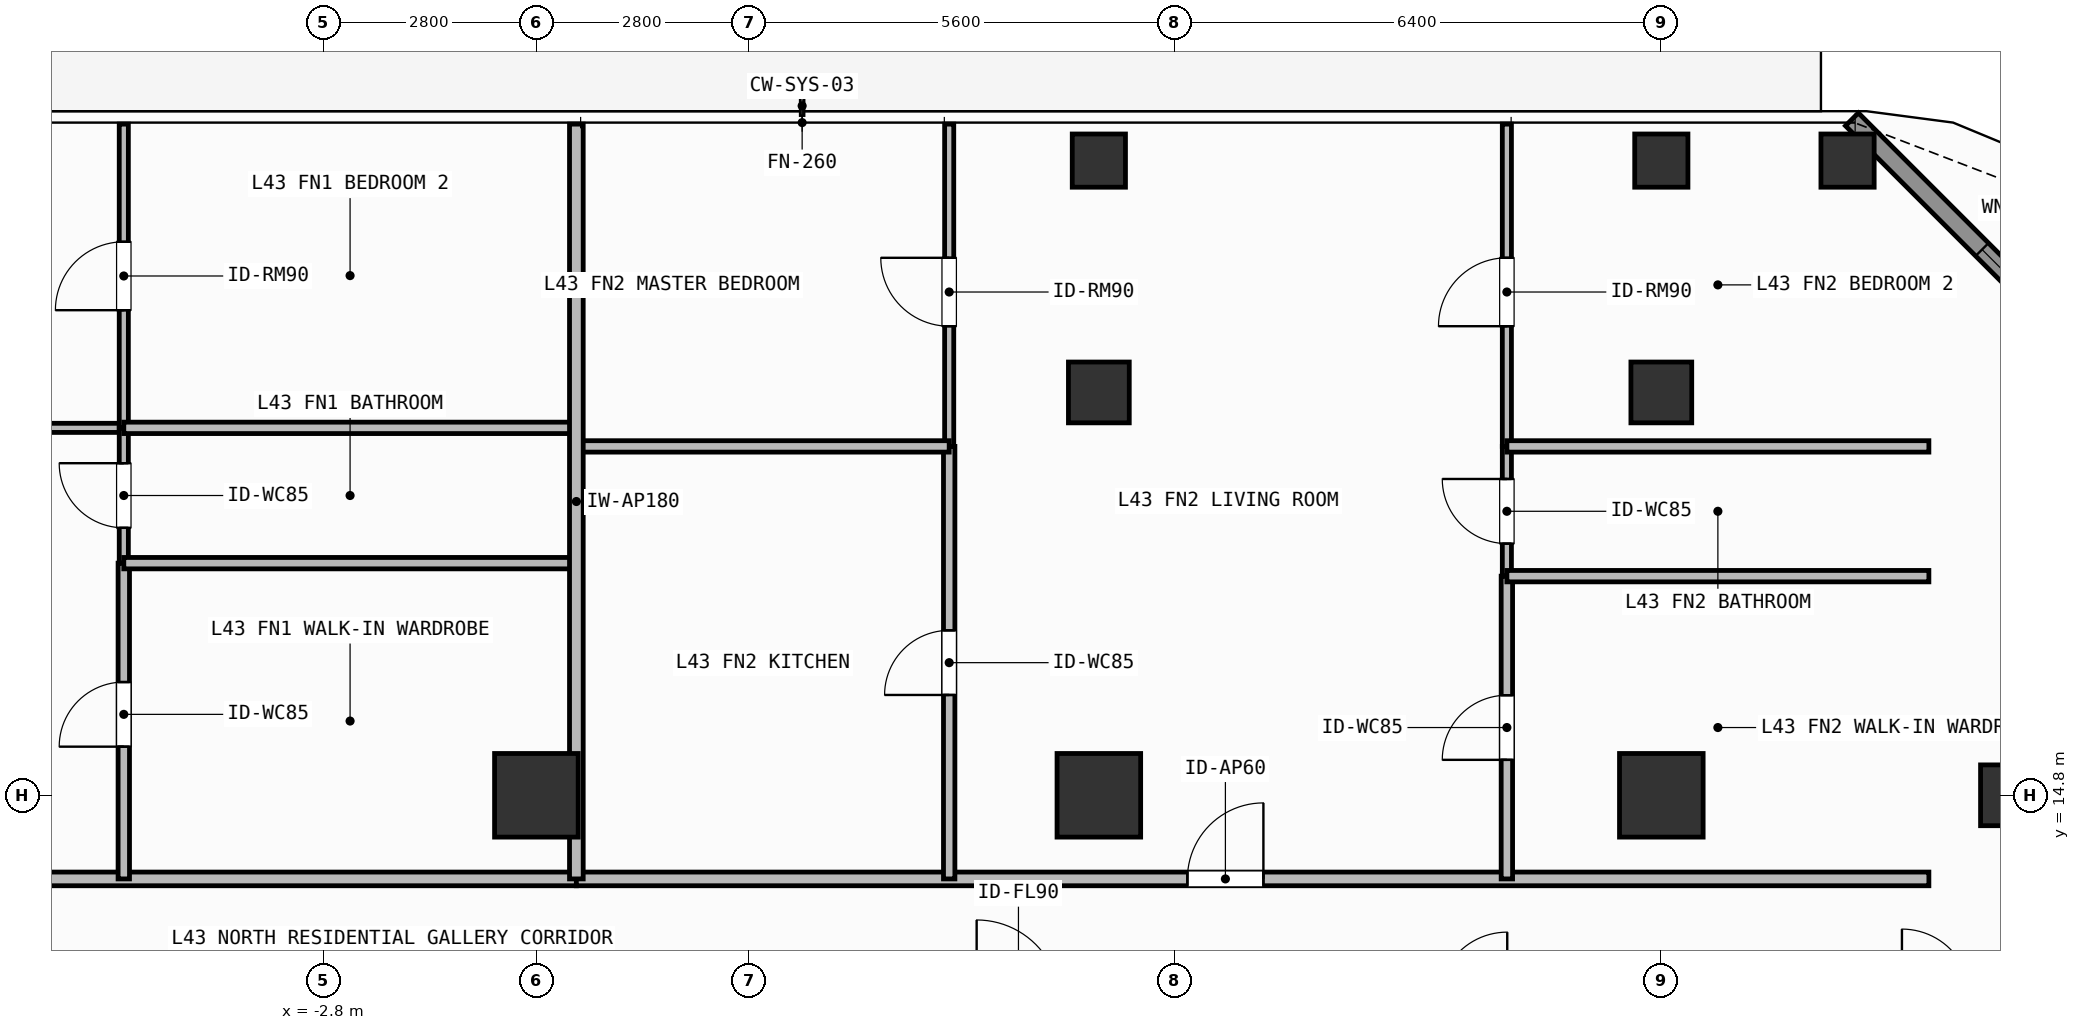
"""IFC4 building model, lengths in metres.
Left out: names, types, materials, properties, quantities, classifications, styles, units other than length and angle.
Written with IfcOpenShell. Run it as: python <this file> out.ifc"""

import sys

from ifc_helpers import new_model, si_unit, direction, frame, frame_2d, origin, origin_2d, place, context, subcontext, project, spatial, rectangle, hollow_rectangle, extrude, element, fill, save


model = new_model("IFC4")
c1 = context("Model", 3, precision=1e-05, world=origin(), true_north=direction((0.0, 1.0)))
c2 = subcontext(c1, "Body", "Model", "MODEL_VIEW")
j1 = project(units=[si_unit("LENGTHUNIT", "METRE"), si_unit("PLANEANGLEUNIT", "RADIAN")], contexts=[c1])
p1 = place(None, origin())
s1 = spatial("IfcSite", under=j1, at=p1, CompositionType="ELEMENT")
p2 = place(p1, origin())
s2 = spatial("IfcBuilding", under=s1, at=p2, CompositionType="ELEMENT")
p3 = place(p2, frame((0.0, 0.0, 175.8)))
s3 = spatial("IfcBuildingStorey", under=s2, at=p3, CompositionType="ELEMENT", Elevation=175.8)
for number, where, z_axis, x_axis in (
    (1, (0.0, 14.8, 0.0), (0.0, 0.0, 1.0), (1.0, 0.0, 0.0)),
    (2, (7.4, 14.8, 0.0), (0.0, 0.0, 1.0), (1.0, 0.0, 0.0)),
    (3, (14.8, 14.8, 0.0), (0.0, 0.0, 1.0), (1.0, 0.0, 0.0)),
):
    element("IfcColumn", number, at=place(p3, frame(where, z_axis=z_axis, x_axis=x_axis)), inside=s3, PredefinedType="COLUMN", context=c2, shape_type="SweptSolid", body=[
        extrude(rectangle(XDim=1.1, YDim=1.1, at=origin_2d()), origin(), (0.0, 0.0, 1.0), 3.9),
    ])
for number, where, z_axis, x_axis in (
    (4, (19.4, 14.8, 0.0), (0.0, 0.0, 1.0), (1.0, 0.0, 0.0)),
    (5, (7.4, 20.1, 0.0), (0.0, 0.0, 1.0), (1.0, 0.0, 0.0)),
    (6, (14.8, 20.1, 0.0), (0.0, 0.0, 1.0), (1.0, 0.0, 0.0)),
):
    element("IfcColumn", number, at=place(p3, frame(where, z_axis=z_axis, x_axis=x_axis)), inside=s3, PredefinedType="COLUMN", context=c2, shape_type="SweptSolid", body=[
        extrude(hollow_rectangle(XDim=0.8, YDim=0.8, WallThickness=0.036, at=origin_2d()), origin(), (0.0, 0.0, 1.0), 3.9),
    ])
for number, where, z_axis, x_axis in (
    (7, (17.25, 23.15, 0.0), (0.0, 0.0, 1.0), (1.0, 0.0, 0.0)),
    (8, (7.4, 23.15, 0.0), (0.0, 0.0, 1.0), (1.0, 0.0, 0.0)),
    (9, (14.8, 23.15, 0.0), (0.0, 0.0, 1.0), (1.0, 0.0, 0.0)),
):
    element("IfcColumn", number, at=place(p3, frame(where, z_axis=z_axis, x_axis=x_axis)), inside=s3, PredefinedType="COLUMN", context=c2, shape_type="SweptSolid", body=[
        extrude(hollow_rectangle(XDim=0.7, YDim=0.7, WallThickness=0.032, at=origin_2d()), origin(), (0.0, 0.0, 1.0), 3.9),
    ])
p4 = place(p3, frame((17.308, 23.692, 0.0), z_axis=(0.0, 0.0, 1.0), x_axis=(0.707106781187, -0.707106781187, 0.0)))
e10 = element("IfcWall", 10, at=p4, inside=s3, PredefinedType="SOLIDWALL", context=c2, shape_type="SweptSolid", body=[
    extrude(rectangle(XDim=6.343, YDim=0.24, at=frame_2d((3.171, 0.0))), origin(), (0.0, 0.0, 1.0), 3.68),
])
p5 = place(p4, frame((2.421, 0.0, 0.8)))
e11 = element("IfcOpeningElement", 11, at=p5, cuts=e10, PredefinedType="OPENING", context=c2, shape_type="SweptSolid", body=[
    extrude(rectangle(XDim=1.5, YDim=1.85, at=frame_2d((0.75, 0.925))), frame((0.0, 0.13, 0.0), z_axis=(0.0, -1.0, 0.0), x_axis=(1.0, 0.0, 0.0)), (0.0, 0.0, 1.0), 0.26),
])
p6 = place(p3, frame((-22.12, 13.7, 0.0), z_axis=(0.0, 0.0, 1.0), x_axis=(1.0, 0.0, 0.0)))
e12 = element("IfcWall", 12, at=p6, inside=s3, PredefinedType="PARTITIONING", context=c2, shape_type="SweptSolid", body=[
    extrude(rectangle(XDim=22.646, YDim=0.18, at=frame_2d((11.323, 0.0))), origin(), (0.0, 0.0, 1.0), 3.68),
])
p7 = place(p6, frame((10.554, 0.0, 0.0)))
e13 = element("IfcOpeningElement", 13, at=p7, cuts=e12, PredefinedType="OPENING", context=c2, shape_type="SweptSolid", body=[
    extrude(rectangle(XDim=1.0, YDim=2.2, at=frame_2d((0.5, 1.1))), frame((0.0, 0.1, 0.0), z_axis=(0.0, -1.0, 0.0), x_axis=(1.0, 0.0, 0.0)), (0.0, 0.0, 1.0), 0.2),
])
p8 = place(p3, frame((-16.726, 19.634, 0.0), z_axis=(0.0, 0.0, 1.0), x_axis=(1.0, 0.0, 0.0)))
e14 = element("IfcWall", 14, at=p8, inside=s3, PredefinedType="PARTITIONING", context=c2, shape_type="SweptSolid", body=[
    extrude(rectangle(XDim=11.298, YDim=0.12, at=frame_2d((5.649, 0.0))), origin(), (0.0, 0.0, 1.0), 3.68),
])
p9 = place(p8, frame((5.199, 0.0, 0.0)))
e15 = element("IfcOpeningElement", 15, at=p9, cuts=e14, PredefinedType="OPENING", context=c2, shape_type="SweptSolid", body=[
    extrude(rectangle(XDim=0.9, YDim=2.1, at=frame_2d((0.45, 1.05))), frame((0.0, 0.07, 0.0), z_axis=(0.0, -1.0, 0.0), x_axis=(1.0, 0.0, 0.0)), (0.0, 0.0, 1.0), 0.14),
])
p10 = place(p3, frame((-5.428, 13.7, 0.0), z_axis=(0.0, 0.0, 1.0), x_axis=(0.0, 1.0, 0.0)))
e16 = element("IfcWall", 16, at=p10, inside=s3, PredefinedType="PARTITIONING", context=c2, shape_type="SweptSolid", body=[
    extrude(rectangle(XDim=4.154, YDim=0.15, at=frame_2d((2.077, 0.0))), origin(), (0.0, 0.0, 1.0), 3.68),
])
p11 = place(p10, frame((1.74, 0.0, 0.0)))
e17 = element("IfcOpeningElement", 17, at=p11, cuts=e16, PredefinedType="OPENING", context=c2, shape_type="SweptSolid", body=[
    extrude(rectangle(XDim=0.85, YDim=2.1, at=frame_2d((0.425, 1.05))), frame((0.0, 0.085, 0.0), z_axis=(0.0, -1.0, 0.0), x_axis=(1.0, 0.0, 0.0)), (0.0, 0.0, 1.0), 0.17),
])
p12 = place(p3, frame((-5.428, 17.854, 0.0), z_axis=(0.0, 0.0, 1.0), x_axis=(0.0, 1.0, 0.0)))
e18 = element("IfcWall", 18, at=p12, inside=s3, PredefinedType="PARTITIONING", context=c2, shape_type="SweptSolid", body=[
    extrude(rectangle(XDim=1.78, YDim=0.12, at=frame_2d((0.89, 0.0))), origin(), (0.0, 0.0, 1.0), 3.68),
])
p13 = place(p12, frame((0.465, 0.0, 0.0)))
e19 = element("IfcOpeningElement", 19, at=p13, cuts=e18, PredefinedType="OPENING", context=c2, shape_type="SweptSolid", body=[
    extrude(rectangle(XDim=0.85, YDim=2.1, at=frame_2d((0.425, 1.05))), frame((0.0, 0.07, 0.0), z_axis=(0.0, -1.0, 0.0), x_axis=(1.0, 0.0, 0.0)), (0.0, 0.0, 1.0), 0.14),
])
p14 = place(p3, frame((-5.428, 19.634, 0.0), z_axis=(0.0, 0.0, 1.0), x_axis=(0.0, 1.0, 0.0)))
e20 = element("IfcWall", 20, at=p14, inside=s3, PredefinedType="PARTITIONING", context=c2, shape_type="SweptSolid", body=[
    extrude(rectangle(XDim=3.996, YDim=0.12, at=frame_2d((1.998, 0.0))), origin(), (0.0, 0.0, 1.0), 3.68),
])
p15 = place(p14, frame((1.548, 0.0, 0.0)))
e21 = element("IfcOpeningElement", 21, at=p15, cuts=e20, PredefinedType="OPENING", context=c2, shape_type="SweptSolid", body=[
    extrude(rectangle(XDim=0.9, YDim=2.1, at=frame_2d((0.45, 1.05))), frame((0.0, 0.07, 0.0), z_axis=(0.0, -1.0, 0.0), x_axis=(1.0, 0.0, 0.0)), (0.0, 0.0, 1.0), 0.14),
])
p16 = place(p3, frame((0.526, 13.7, 0.0), z_axis=(0.0, 0.0, 1.0), x_axis=(1.0, 0.0, 0.0)))
e22 = element("IfcWall", 22, at=p16, inside=s3, PredefinedType="PARTITIONING", context=c2, shape_type="SweptSolid", body=[
    extrude(rectangle(XDim=17.794, YDim=0.18, at=frame_2d((8.897, 0.0))), origin(), (0.0, 0.0, 1.0), 3.68),
])
p17 = place(p16, frame((8.039, 0.0, 0.0)))
e23 = element("IfcOpeningElement", 23, at=p17, cuts=e22, PredefinedType="OPENING", context=c2, shape_type="SweptSolid", body=[
    extrude(rectangle(XDim=1.0, YDim=2.2, at=frame_2d((0.5, 1.1))), frame((0.0, 0.1, 0.0), z_axis=(0.0, -1.0, 0.0), x_axis=(1.0, 0.0, 0.0)), (0.0, 0.0, 1.0), 0.2),
])
p18 = place(p3, frame((5.431, 13.7, 0.0), z_axis=(0.0, 0.0, 1.0), x_axis=(0.0, 1.0, 0.0)))
e24 = element("IfcWall", 24, at=p18, inside=s3, PredefinedType="PARTITIONING", context=c2, shape_type="SweptSolid", body=[
    extrude(rectangle(XDim=5.69, YDim=0.15, at=frame_2d((2.845, 0.0))), origin(), (0.0, 0.0, 1.0), 3.68),
])
p19 = place(p18, frame((2.42, 0.0, 0.0)))
e25 = element("IfcOpeningElement", 25, at=p19, cuts=e24, PredefinedType="OPENING", context=c2, shape_type="SweptSolid", body=[
    extrude(rectangle(XDim=0.85, YDim=2.1, at=frame_2d((0.425, 1.05))), frame((0.0, 0.085, 0.0), z_axis=(0.0, -1.0, 0.0), x_axis=(1.0, 0.0, 0.0)), (0.0, 0.0, 1.0), 0.17),
])
p20 = place(p3, frame((5.431, 19.39, 0.0), z_axis=(0.0, 0.0, 1.0), x_axis=(0.0, 1.0, 0.0)))
e26 = element("IfcWall", 26, at=p20, inside=s3, PredefinedType="PARTITIONING", context=c2, shape_type="SweptSolid", body=[
    extrude(rectangle(XDim=4.24, YDim=0.12, at=frame_2d((2.12, 0.0))), origin(), (0.0, 0.0, 1.0), 3.68),
])
p21 = place(p20, frame((1.581, 0.0, 0.0)))
e27 = element("IfcOpeningElement", 27, at=p21, cuts=e26, PredefinedType="OPENING", context=c2, shape_type="SweptSolid", body=[
    extrude(rectangle(XDim=0.9, YDim=2.1, at=frame_2d((0.45, 1.05))), frame((0.0, 0.07, 0.0), z_axis=(0.0, -1.0, 0.0), x_axis=(1.0, 0.0, 0.0)), (0.0, 0.0, 1.0), 0.14),
])
p22 = place(p3, frame((12.768, 13.7, 0.0), z_axis=(0.0, 0.0, 1.0), x_axis=(0.0, 1.0, 0.0)))
e28 = element("IfcWall", 28, at=p22, inside=s3, PredefinedType="PARTITIONING", context=c2, shape_type="SweptSolid", body=[
    extrude(rectangle(XDim=3.983, YDim=0.15, at=frame_2d((1.992, 0.0))), origin(), (0.0, 0.0, 1.0), 3.68),
])
p23 = place(p22, frame((1.566, 0.0, 0.0)))
e29 = element("IfcOpeningElement", 29, at=p23, cuts=e28, PredefinedType="OPENING", context=c2, shape_type="SweptSolid", body=[
    extrude(rectangle(XDim=0.85, YDim=2.1, at=frame_2d((0.425, 1.05))), frame((0.0, 0.085, 0.0), z_axis=(0.0, -1.0, 0.0), x_axis=(1.0, 0.0, 0.0)), (0.0, 0.0, 1.0), 0.17),
])
p24 = place(p3, frame((12.768, 17.683, 0.0), z_axis=(0.0, 0.0, 1.0), x_axis=(0.0, 1.0, 0.0)))
e30 = element("IfcWall", 30, at=p24, inside=s3, PredefinedType="PARTITIONING", context=c2, shape_type="SweptSolid", body=[
    extrude(rectangle(XDim=1.707, YDim=0.12, at=frame_2d((0.854, 0.0))), origin(), (0.0, 0.0, 1.0), 3.68),
])
p25 = place(p24, frame((0.428, 0.0, 0.0)))
e31 = element("IfcOpeningElement", 31, at=p25, cuts=e30, PredefinedType="OPENING", context=c2, shape_type="SweptSolid", body=[
    extrude(rectangle(XDim=0.85, YDim=2.1, at=frame_2d((0.425, 1.05))), frame((0.0, 0.07, 0.0), z_axis=(0.0, -1.0, 0.0), x_axis=(1.0, 0.0, 0.0)), (0.0, 0.0, 1.0), 0.14),
])
p26 = place(p3, frame((12.768, 19.39, 0.0), z_axis=(0.0, 0.0, 1.0), x_axis=(0.0, 1.0, 0.0)))
e32 = element("IfcWall", 32, at=p26, inside=s3, PredefinedType="PARTITIONING", context=c2, shape_type="SweptSolid", body=[
    extrude(rectangle(XDim=4.24, YDim=0.12, at=frame_2d((2.12, 0.0))), origin(), (0.0, 0.0, 1.0), 3.68),
])
p27 = place(p26, frame((1.581, 0.0, 0.0)))
e33 = element("IfcOpeningElement", 33, at=p27, cuts=e32, PredefinedType="OPENING", context=c2, shape_type="SweptSolid", body=[
    extrude(rectangle(XDim=0.9, YDim=2.1, at=frame_2d((0.45, 1.05))), frame((0.0, 0.07, 0.0), z_axis=(0.0, -1.0, 0.0), x_axis=(1.0, 0.0, 0.0)), (0.0, 0.0, 1.0), 0.14),
])
for number, where, z_axis, x_axis in (
    (34, (-5.428, 17.854, 0.0), (0.0, 0.0, 1.0), (1.0, 0.0, 0.0)),
    (35, (-5.428, 19.634, 0.0), (0.0, 0.0, 1.0), (1.0, 0.0, 0.0)),
):
    element("IfcWall", number, at=place(p3, frame(where, z_axis=z_axis, x_axis=x_axis)), inside=s3, PredefinedType="PARTITIONING", context=c2, shape_type="SweptSolid", body=[
        extrude(rectangle(XDim=5.954, YDim=0.15, at=frame_2d((2.977, 0.0))), origin(), (0.0, 0.0, 1.0), 3.68),
    ])
p28 = place(p3, frame((0.526, 19.39, 0.0), z_axis=(0.0, 0.0, 1.0), x_axis=(1.0, 0.0, 0.0)))
e36 = element("IfcWall", 36, at=p28, inside=s3, PredefinedType="PARTITIONING", context=c2, shape_type="SweptSolid", body=[
    extrude(rectangle(XDim=4.905, YDim=0.15, at=frame_2d((2.453, 0.0))), origin(), (0.0, 0.0, 1.0), 3.68),
])
for number, where, z_axis, x_axis in (
    (37, (12.768, 17.683, 0.0), (0.0, 0.0, 1.0), (1.0, 0.0, 0.0)),
    (38, (12.768, 19.39, 0.0), (0.0, 0.0, 1.0), (1.0, 0.0, 0.0)),
):
    element("IfcWall", number, at=place(p3, frame(where, z_axis=z_axis, x_axis=x_axis)), inside=s3, PredefinedType="PARTITIONING", context=c2, shape_type="SweptSolid", body=[
        extrude(rectangle(XDim=5.552, YDim=0.15, at=frame_2d((2.776, 0.0))), origin(), (0.0, 0.0, 1.0), 3.68),
    ])
p29 = place(p3, frame((0.526, 13.7, 0.0), z_axis=(0.0, 0.0, 1.0), x_axis=(0.0, 1.0, 0.0)))
e39 = element("IfcWall", 39, at=p29, inside=s3, PredefinedType="PARTITIONING", context=c2, shape_type="SweptSolid", body=[
    extrude(rectangle(XDim=9.93, YDim=0.18, at=frame_2d((4.965, 0.0))), origin(), (0.0, 0.0, 1.0), 3.68),
])
p30 = place(p5, origin())
e40 = element("IfcWindow", 40, at=p30, inside=s3, PartitioningType="SINGLE_PANEL", PredefinedType="WINDOW", context=c2, shape_type="SweptSolid", body=[
    extrude(rectangle(XDim=1.5, YDim=1.85, at=frame_2d((0.75, 0.925))), frame((0.0, 0.03, 0.0), z_axis=(0.0, -1.0, 0.0), x_axis=(1.0, 0.0, 0.0)), (0.0, 0.0, 1.0), 0.06),
])
fill(e11, e40)
p31 = place(p11, origin())
e41 = element("IfcDoor", 41, at=p31, inside=s3, OperationType="SINGLE_SWING_LEFT", PredefinedType="DOOR", context=c2, shape_type="SweptSolid", body=[
    extrude(rectangle(XDim=0.85, YDim=2.1, at=frame_2d((0.425, 1.05))), frame((0.0, 0.025, 0.0), z_axis=(0.0, -1.0, 0.0), x_axis=(1.0, 0.0, 0.0)), (0.0, 0.0, 1.0), 0.05),
])
fill(e17, e41)
p32 = place(p13, origin())
e42 = element("IfcDoor", 42, at=p32, inside=s3, OperationType="SINGLE_SWING_RIGHT", PredefinedType="DOOR", context=c2, shape_type="SweptSolid", body=[
    extrude(rectangle(XDim=0.85, YDim=2.1, at=frame_2d((0.425, 1.05))), frame((0.0, 0.025, 0.0), z_axis=(0.0, -1.0, 0.0), x_axis=(1.0, 0.0, 0.0)), (0.0, 0.0, 1.0), 0.05),
])
fill(e19, e42)
p33 = place(p15, origin())
e43 = element("IfcDoor", 43, at=p33, inside=s3, OperationType="SINGLE_SWING_LEFT", PredefinedType="DOOR", context=c2, shape_type="SweptSolid", body=[
    extrude(rectangle(XDim=0.9, YDim=2.1, at=frame_2d((0.45, 1.05))), frame((0.0, 0.025, 0.0), z_axis=(0.0, -1.0, 0.0), x_axis=(1.0, 0.0, 0.0)), (0.0, 0.0, 1.0), 0.05),
])
fill(e21, e43)
p34 = place(p17, origin())
e44 = element("IfcDoor", 44, at=p34, inside=s3, OperationType="SINGLE_SWING_RIGHT", PredefinedType="DOOR", context=c2, shape_type="SweptSolid", body=[
    extrude(rectangle(XDim=1.0, YDim=2.2, at=frame_2d((0.5, 1.1))), frame((0.0, 0.025, 0.0), z_axis=(0.0, -1.0, 0.0), x_axis=(1.0, 0.0, 0.0)), (0.0, 0.0, 1.0), 0.05),
])
fill(e23, e44)
p35 = place(p19, origin())
e45 = element("IfcDoor", 45, at=p35, inside=s3, OperationType="SINGLE_SWING_LEFT", PredefinedType="DOOR", context=c2, shape_type="SweptSolid", body=[
    extrude(rectangle(XDim=0.85, YDim=2.1, at=frame_2d((0.425, 1.05))), frame((0.0, 0.025, 0.0), z_axis=(0.0, -1.0, 0.0), x_axis=(1.0, 0.0, 0.0)), (0.0, 0.0, 1.0), 0.05),
])
fill(e25, e45)
p36 = place(p21, origin())
e46 = element("IfcDoor", 46, at=p36, inside=s3, OperationType="SINGLE_SWING_RIGHT", PredefinedType="DOOR", context=c2, shape_type="SweptSolid", body=[
    extrude(rectangle(XDim=0.9, YDim=2.1, at=frame_2d((0.45, 1.05))), frame((0.0, 0.025, 0.0), z_axis=(0.0, -1.0, 0.0), x_axis=(1.0, 0.0, 0.0)), (0.0, 0.0, 1.0), 0.05),
])
fill(e27, e46)
p37 = place(p23, origin())
e47 = element("IfcDoor", 47, at=p37, inside=s3, OperationType="SINGLE_SWING_LEFT", PredefinedType="DOOR", context=c2, shape_type="SweptSolid", body=[
    extrude(rectangle(XDim=0.85, YDim=2.1, at=frame_2d((0.425, 1.05))), frame((0.0, 0.025, 0.0), z_axis=(0.0, -1.0, 0.0), x_axis=(1.0, 0.0, 0.0)), (0.0, 0.0, 1.0), 0.05),
])
fill(e29, e47)
p38 = place(p25, origin())
e48 = element("IfcDoor", 48, at=p38, inside=s3, OperationType="SINGLE_SWING_RIGHT", PredefinedType="DOOR", context=c2, shape_type="SweptSolid", body=[
    extrude(rectangle(XDim=0.85, YDim=2.1, at=frame_2d((0.425, 1.05))), frame((0.0, 0.025, 0.0), z_axis=(0.0, -1.0, 0.0), x_axis=(1.0, 0.0, 0.0)), (0.0, 0.0, 1.0), 0.05),
])
fill(e31, e48)
p39 = place(p27, origin())
e49 = element("IfcDoor", 49, at=p39, inside=s3, OperationType="SINGLE_SWING_LEFT", PredefinedType="DOOR", context=c2, shape_type="SweptSolid", body=[
    extrude(rectangle(XDim=0.9, YDim=2.1, at=frame_2d((0.45, 1.05))), frame((0.0, 0.025, 0.0), z_axis=(0.0, -1.0, 0.0), x_axis=(1.0, 0.0, 0.0)), (0.0, 0.0, 1.0), 0.05),
])
fill(e33, e49)
save(model, sys.argv[1])
